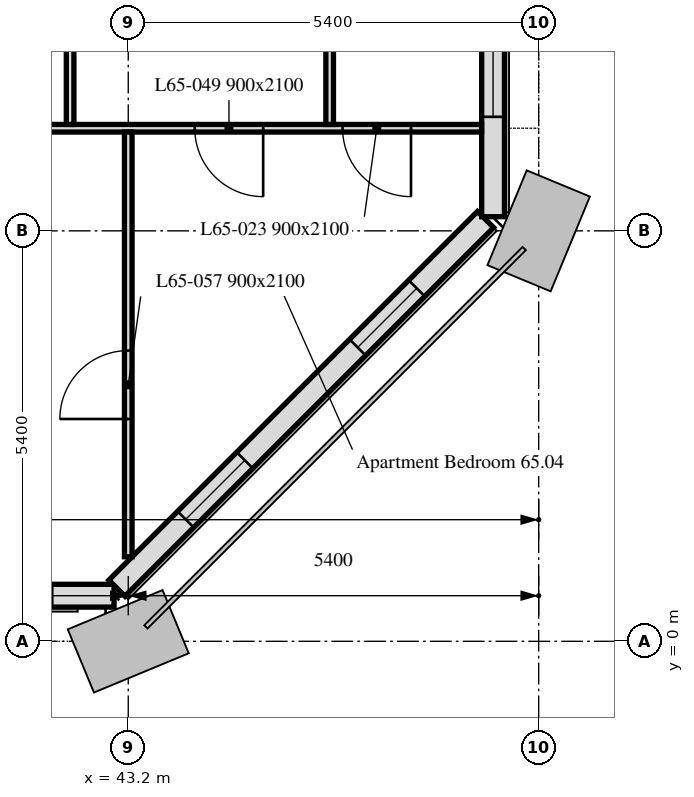
"""IFC4 building model, lengths in metres.
Left out: names, types, materials, properties, quantities, classifications, styles, units other than length and angle.
Written with IfcOpenShell. Run it as: python <this file> out.ifc"""

import sys

from ifc_helpers import new_model, si_unit, direction, frame, frame_2d, origin, place, context, subcontext, project, spatial, rectangle, extrude, element, fill, save


model = new_model("IFC4")
c1 = context("Model", 3, precision=1e-05, world=origin(), true_north=direction((0.0, 1.0)))
c2 = subcontext(c1, "Body", "Model", "MODEL_VIEW")
j1 = project(units=[si_unit("LENGTHUNIT", "METRE"), si_unit("PLANEANGLEUNIT", "RADIAN")], contexts=[c1])
p1 = place(None, origin())
s1 = spatial("IfcSite", under=j1, at=p1, CompositionType="ELEMENT")
p2 = place(p1, origin())
s2 = spatial("IfcBuilding", under=s1, at=p2, CompositionType="ELEMENT")
p3 = place(p2, frame((0.0, 0.0, 268.6)))
s3 = spatial("IfcBuildingStorey", under=s2, at=p3, CompositionType="ELEMENT", Elevation=268.6)
p4 = place(p3, frame((10.986, 0.6, 0.0), z_axis=(0.0, 0.0, 1.0), x_axis=(1.0, 0.0, 0.0)))
e1 = element("IfcWall", 1, at=p4, inside=s3, PredefinedType="SOLIDWALL", context=c2, shape_type="SweptSolid", body=[
    extrude(rectangle(XDim=32.027, YDim=0.3, at=frame_2d((16.014, 0.0))), origin(), (0.0, 0.0, 1.0), 3.0),
])
p5 = place(p4, frame((2.764, 0.0, 0.9)))
e2 = element("IfcOpeningElement", 2, at=p5, cuts=e1, PredefinedType="OPENING", context=c2, shape_type="SweptSolid", body=[
    extrude(rectangle(XDim=1.1, YDim=1.7, at=frame_2d((0.55, 0.85))), frame((0.0, 0.16, 0.0), z_axis=(0.0, -1.0, 0.0), x_axis=(1.0, 0.0, 0.0)), (0.0, 0.0, 1.0), 0.32),
])
p6 = place(p4, frame((6.214, 0.0, 0.9)))
e3 = element("IfcOpeningElement", 3, at=p6, cuts=e1, PredefinedType="OPENING", context=c2, shape_type="SweptSolid", body=[
    extrude(rectangle(XDim=3.4, YDim=1.7, at=frame_2d((1.7, 0.85))), frame((0.0, 0.16, 0.0), z_axis=(0.0, -1.0, 0.0), x_axis=(1.0, 0.0, 0.0)), (0.0, 0.0, 1.0), 0.32),
])
p7 = place(p4, frame((13.564, 0.0, 0.9)))
e4 = element("IfcOpeningElement", 4, at=p7, cuts=e1, PredefinedType="OPENING", context=c2, shape_type="SweptSolid", body=[
    extrude(rectangle(XDim=1.1, YDim=1.7, at=frame_2d((0.55, 0.85))), frame((0.0, 0.16, 0.0), z_axis=(0.0, -1.0, 0.0), x_axis=(1.0, 0.0, 0.0)), (0.0, 0.0, 1.0), 0.32),
])
p8 = place(p4, frame((17.014, 0.0, 0.9)))
e5 = element("IfcOpeningElement", 5, at=p8, cuts=e1, PredefinedType="OPENING", context=c2, shape_type="SweptSolid", body=[
    extrude(rectangle(XDim=3.4, YDim=1.7, at=frame_2d((1.7, 0.85))), frame((0.0, 0.16, 0.0), z_axis=(0.0, -1.0, 0.0), x_axis=(1.0, 0.0, 0.0)), (0.0, 0.0, 1.0), 0.32),
])
p9 = place(p4, frame((24.364, 0.0, 0.9)))
e6 = element("IfcOpeningElement", 6, at=p9, cuts=e1, PredefinedType="OPENING", context=c2, shape_type="SweptSolid", body=[
    extrude(rectangle(XDim=1.1, YDim=1.7, at=frame_2d((0.55, 0.85))), frame((0.0, 0.16, 0.0), z_axis=(0.0, -1.0, 0.0), x_axis=(1.0, 0.0, 0.0)), (0.0, 0.0, 1.0), 0.32),
])
p10 = place(p4, frame((27.814, 0.0, 0.9)))
e7 = element("IfcOpeningElement", 7, at=p10, cuts=e1, PredefinedType="OPENING", context=c2, shape_type="SweptSolid", body=[
    extrude(rectangle(XDim=3.4, YDim=1.7, at=frame_2d((1.7, 0.85))), frame((0.0, 0.16, 0.0), z_axis=(0.0, -1.0, 0.0), x_axis=(1.0, 0.0, 0.0)), (0.0, 0.0, 1.0), 0.32),
])
p11 = place(p3, frame((43.051, 0.699, 0.0), z_axis=(0.0, 0.0, 1.0), x_axis=(0.707106781187, 0.707106781187, 0.0)))
e8 = element("IfcWall", 8, at=p11, inside=s3, PredefinedType="SOLIDWALL", context=c2, shape_type="SweptSolid", body=[
    extrude(rectangle(XDim=6.86, YDim=0.3, at=frame_2d((3.43, 0.0))), origin(), (0.0, 0.0, 1.0), 3.0),
])
p12 = place(p11, frame((1.28, 0.0, 0.9)))
e9 = element("IfcOpeningElement", 9, at=p12, cuts=e8, PredefinedType="OPENING", context=c2, shape_type="SweptSolid", body=[
    extrude(rectangle(XDim=1.1, YDim=1.7, at=frame_2d((0.55, 0.85))), frame((0.0, 0.16, 0.0), z_axis=(0.0, -1.0, 0.0), x_axis=(1.0, 0.0, 0.0)), (0.0, 0.0, 1.0), 0.32),
])
p13 = place(p11, frame((4.48, 0.0, 0.9)))
e10 = element("IfcOpeningElement", 10, at=p13, cuts=e8, PredefinedType="OPENING", context=c2, shape_type="SweptSolid", body=[
    extrude(rectangle(XDim=1.1, YDim=1.7, at=frame_2d((0.55, 0.85))), frame((0.0, 0.16, 0.0), z_axis=(0.0, -1.0, 0.0), x_axis=(1.0, 0.0, 0.0)), (0.0, 0.0, 1.0), 0.32),
])
p14 = place(p3, frame((48.0, 5.586, 0.0), z_axis=(0.0, 0.0, 1.0), x_axis=(0.0, 1.0, 0.0)))
e11 = element("IfcWall", 11, at=p14, inside=s3, PredefinedType="SOLIDWALL", context=c2, shape_type="SweptSolid", body=[
    extrude(rectangle(XDim=32.027, YDim=0.3, at=frame_2d((16.014, 0.0))), origin(), (0.0, 0.0, 1.0), 3.0),
])
p15 = place(p14, frame((1.314, 0.0, 0.9)))
e12 = element("IfcOpeningElement", 12, at=p15, cuts=e11, PredefinedType="OPENING", context=c2, shape_type="SweptSolid", body=[
    extrude(rectangle(XDim=1.1, YDim=1.7, at=frame_2d((0.55, 0.85))), frame((0.0, 0.16, 0.0), z_axis=(0.0, -1.0, 0.0), x_axis=(1.0, 0.0, 0.0)), (0.0, 0.0, 1.0), 0.32),
])
p16 = place(p14, frame((2.764, 0.0, 0.9)))
e13 = element("IfcOpeningElement", 13, at=p16, cuts=e11, PredefinedType="OPENING", context=c2, shape_type="SweptSolid", body=[
    extrude(rectangle(XDim=1.1, YDim=1.7, at=frame_2d((0.55, 0.85))), frame((0.0, 0.16, 0.0), z_axis=(0.0, -1.0, 0.0), x_axis=(1.0, 0.0, 0.0)), (0.0, 0.0, 1.0), 0.32),
])
p17 = place(p14, frame((6.564, 0.0, 0.9)))
e14 = element("IfcOpeningElement", 14, at=p17, cuts=e11, PredefinedType="OPENING", context=c2, shape_type="SweptSolid", body=[
    extrude(rectangle(XDim=1.1, YDim=1.7, at=frame_2d((0.55, 0.85))), frame((0.0, 0.16, 0.0), z_axis=(0.0, -1.0, 0.0), x_axis=(1.0, 0.0, 0.0)), (0.0, 0.0, 1.0), 0.32),
])
p18 = place(p14, frame((8.514, 0.0, 0.9)))
e15 = element("IfcOpeningElement", 15, at=p18, cuts=e11, PredefinedType="OPENING", context=c2, shape_type="SweptSolid", body=[
    extrude(rectangle(XDim=1.1, YDim=1.7, at=frame_2d((0.55, 0.85))), frame((0.0, 0.16, 0.0), z_axis=(0.0, -1.0, 0.0), x_axis=(1.0, 0.0, 0.0)), (0.0, 0.0, 1.0), 0.32),
])
p19 = place(p14, frame((11.964, 0.0, 0.9)))
e16 = element("IfcOpeningElement", 16, at=p19, cuts=e11, PredefinedType="OPENING", context=c2, shape_type="SweptSolid", body=[
    extrude(rectangle(XDim=1.1, YDim=1.7, at=frame_2d((0.55, 0.85))), frame((0.0, 0.16, 0.0), z_axis=(0.0, -1.0, 0.0), x_axis=(1.0, 0.0, 0.0)), (0.0, 0.0, 1.0), 0.32),
])
p20 = place(p14, frame((13.564, 0.0, 0.9)))
e17 = element("IfcOpeningElement", 17, at=p20, cuts=e11, PredefinedType="OPENING", context=c2, shape_type="SweptSolid", body=[
    extrude(rectangle(XDim=1.1, YDim=1.7, at=frame_2d((0.55, 0.85))), frame((0.0, 0.16, 0.0), z_axis=(0.0, -1.0, 0.0), x_axis=(1.0, 0.0, 0.0)), (0.0, 0.0, 1.0), 0.32),
])
p21 = place(p14, frame((17.014, 0.0, 0.9)))
e18 = element("IfcOpeningElement", 18, at=p21, cuts=e11, PredefinedType="OPENING", context=c2, shape_type="SweptSolid", body=[
    extrude(rectangle(XDim=3.4, YDim=1.7, at=frame_2d((1.7, 0.85))), frame((0.0, 0.16, 0.0), z_axis=(0.0, -1.0, 0.0), x_axis=(1.0, 0.0, 0.0)), (0.0, 0.0, 1.0), 0.32),
])
p22 = place(p14, frame((22.764, 0.0, 0.9)))
e19 = element("IfcOpeningElement", 19, at=p22, cuts=e11, PredefinedType="OPENING", context=c2, shape_type="SweptSolid", body=[
    extrude(rectangle(XDim=1.1, YDim=1.7, at=frame_2d((0.55, 0.85))), frame((0.0, 0.16, 0.0), z_axis=(0.0, -1.0, 0.0), x_axis=(1.0, 0.0, 0.0)), (0.0, 0.0, 1.0), 0.32),
])
p23 = place(p14, frame((24.364, 0.0, 0.9)))
e20 = element("IfcOpeningElement", 20, at=p23, cuts=e11, PredefinedType="OPENING", context=c2, shape_type="SweptSolid", body=[
    extrude(rectangle(XDim=1.1, YDim=1.7, at=frame_2d((0.55, 0.85))), frame((0.0, 0.16, 0.0), z_axis=(0.0, -1.0, 0.0), x_axis=(1.0, 0.0, 0.0)), (0.0, 0.0, 1.0), 0.32),
])
p24 = place(p14, frame((28.239, 0.0, 0.9)))
e21 = element("IfcOpeningElement", 21, at=p24, cuts=e11, PredefinedType="OPENING", context=c2, shape_type="SweptSolid", body=[
    extrude(rectangle(XDim=0.65, YDim=1.7, at=frame_2d((0.325, 0.85))), frame((0.0, 0.16, 0.0), z_axis=(0.0, -1.0, 0.0), x_axis=(1.0, 0.0, 0.0)), (0.0, 0.0, 1.0), 0.32),
])
p25 = place(p14, frame((29.764, 0.0, 0.9)))
e22 = element("IfcOpeningElement", 22, at=p25, cuts=e11, PredefinedType="OPENING", context=c2, shape_type="SweptSolid", body=[
    extrude(rectangle(XDim=1.1, YDim=1.7, at=frame_2d((0.55, 0.85))), frame((0.0, 0.16, 0.0), z_axis=(0.0, -1.0, 0.0), x_axis=(1.0, 0.0, 0.0)), (0.0, 0.0, 1.0), 0.32),
])
p26 = place(p3, frame((47.849, 6.75, 0.0), z_axis=(0.0, 0.0, 1.0), x_axis=(-1.0, 0.0, 0.0)))
e23 = element("IfcWall", 23, at=p26, inside=s3, PredefinedType="PARTITIONING", context=c2, shape_type="SweptSolid", body=[
    extrude(rectangle(XDim=15.374, YDim=0.1, at=frame_2d((7.687, 0.0))), origin(), (0.0, 0.0, 1.0), 2.4),
])
p27 = place(p26, frame((0.929, 0.0, 0.0)))
e24 = element("IfcOpeningElement", 24, at=p27, cuts=e23, PredefinedType="OPENING", context=c2, shape_type="SweptSolid", body=[
    extrude(rectangle(XDim=0.9, YDim=2.1, at=frame_2d((0.45, 1.05))), frame((0.0, 0.05, 0.0), z_axis=(0.0, -1.0, 0.0), x_axis=(1.0, 0.0, 0.0)), (0.0, 0.0, 1.0), 0.1),
])
p28 = place(p26, frame((13.149, 0.0, 0.0)))
e25 = element("IfcOpeningElement", 25, at=p28, cuts=e23, PredefinedType="OPENING", context=c2, shape_type="SweptSolid", body=[
    extrude(rectangle(XDim=0.9, YDim=2.1, at=frame_2d((0.45, 1.05))), frame((0.0, 0.05, 0.0), z_axis=(0.0, -1.0, 0.0), x_axis=(1.0, 0.0, 0.0)), (0.0, 0.0, 1.0), 0.1),
])
p29 = place(p26, frame((2.874, 0.0, 0.0)))
e26 = element("IfcOpeningElement", 26, at=p29, cuts=e23, PredefinedType="OPENING", context=c2, shape_type="SweptSolid", body=[
    extrude(rectangle(XDim=0.9, YDim=2.1, at=frame_2d((0.45, 1.05))), frame((0.0, 0.05, 0.0), z_axis=(0.0, -1.0, 0.0), x_axis=(1.0, 0.0, 0.0)), (0.0, 0.0, 1.0), 0.1),
])
p30 = place(p26, frame((8.463, 0.0, 0.0)))
e27 = element("IfcOpeningElement", 27, at=p30, cuts=e23, PredefinedType="OPENING", context=c2, shape_type="SweptSolid", body=[
    extrude(rectangle(XDim=0.9, YDim=2.1, at=frame_2d((0.45, 1.05))), frame((0.0, 0.05, 0.0), z_axis=(0.0, -1.0, 0.0), x_axis=(1.0, 0.0, 0.0)), (0.0, 0.0, 1.0), 0.1),
])
p31 = place(p3, frame((43.2, 1.112, 0.0), z_axis=(0.0, 0.0, 1.0), x_axis=(0.0, 1.0, 0.0)))
e28 = element("IfcWall", 28, at=p31, inside=s3, PredefinedType="PARTITIONING", context=c2, shape_type="SweptSolid", body=[
    extrude(rectangle(XDim=5.588, YDim=0.1, at=frame_2d((2.794, 0.0))), origin(), (0.0, 0.0, 1.0), 3.0),
])
p32 = place(p31, frame((1.813, 0.0, 0.0)))
e29 = element("IfcOpeningElement", 29, at=p32, cuts=e28, PredefinedType="OPENING", context=c2, shape_type="SweptSolid", body=[
    extrude(rectangle(XDim=0.9, YDim=2.1, at=frame_2d((0.45, 1.05))), frame((0.0, 0.05, 0.0), z_axis=(0.0, -1.0, 0.0), x_axis=(1.0, 0.0, 0.0)), (0.0, 0.0, 1.0), 0.1),
])
for number, where, z_axis, x_axis in (
    (30, (42.435, 6.8, 0.0), (0.0, 0.0, 1.0), (0.0, 1.0, 0.0)),
    (31, (45.85, 6.8, 0.0), (0.0, 0.0, 1.0), (0.0, 1.0, 0.0)),
):
    element("IfcWall", number, at=place(p3, frame(where, z_axis=z_axis, x_axis=x_axis)), inside=s3, PredefinedType="PARTITIONING", context=c2, shape_type="SweptSolid", body=[
        extrude(rectangle(XDim=7.075, YDim=0.1, at=frame_2d((3.538, 0.0))), origin(), (0.0, 0.0, 1.0), 2.4),
    ])
p33 = place(p12, origin())
e32 = element("IfcWindow", 32, at=p33, inside=s3, PartitioningType="SINGLE_PANEL", PredefinedType="WINDOW", context=c2, shape_type="SweptSolid", body=[
    extrude(rectangle(XDim=1.1, YDim=1.7, at=frame_2d((0.55, 0.85))), frame((0.0, 0.03, 0.0), z_axis=(0.0, -1.0, 0.0), x_axis=(1.0, 0.0, 0.0)), (0.0, 0.0, 1.0), 0.06),
])
fill(e9, e32)
p34 = place(p13, origin())
e33 = element("IfcWindow", 33, at=p34, inside=s3, PartitioningType="SINGLE_PANEL", PredefinedType="WINDOW", context=c2, shape_type="SweptSolid", body=[
    extrude(rectangle(XDim=1.1, YDim=1.7, at=frame_2d((0.55, 0.85))), frame((0.0, 0.03, 0.0), z_axis=(0.0, -1.0, 0.0), x_axis=(1.0, 0.0, 0.0)), (0.0, 0.0, 1.0), 0.06),
])
fill(e10, e33)
p35 = place(p15, origin())
e34 = element("IfcWindow", 34, at=p35, inside=s3, PartitioningType="SINGLE_PANEL", PredefinedType="WINDOW", context=c2, shape_type="SweptSolid", body=[
    extrude(rectangle(XDim=1.1, YDim=1.7, at=frame_2d((0.55, 0.85))), frame((0.0, 0.03, 0.0), z_axis=(0.0, -1.0, 0.0), x_axis=(1.0, 0.0, 0.0)), (0.0, 0.0, 1.0), 0.06),
])
fill(e12, e34)
p36 = place(p27, origin())
e35 = element("IfcDoor", 35, at=p36, inside=s3, OperationType="SINGLE_SWING_RIGHT", PredefinedType="DOOR", context=c2, shape_type="SweptSolid", body=[
    extrude(rectangle(XDim=0.9, YDim=2.1, at=frame_2d((0.45, 1.05))), frame((0.0, 0.025, 0.0), z_axis=(0.0, -1.0, 0.0), x_axis=(1.0, 0.0, 0.0)), (0.0, 0.0, 1.0), 0.05),
])
fill(e24, e35)
p37 = place(p29, origin())
e36 = element("IfcDoor", 36, at=p37, inside=s3, OperationType="SINGLE_SWING_LEFT", PredefinedType="DOOR", context=c2, shape_type="SweptSolid", body=[
    extrude(rectangle(XDim=0.9, YDim=2.1, at=frame_2d((0.45, 1.05))), frame((0.0, 0.025, 0.0), z_axis=(0.0, -1.0, 0.0), x_axis=(1.0, 0.0, 0.0)), (0.0, 0.0, 1.0), 0.05),
])
fill(e26, e36)
p38 = place(p32, origin())
e37 = element("IfcDoor", 37, at=p38, inside=s3, OperationType="SINGLE_SWING_RIGHT", PredefinedType="DOOR", context=c2, shape_type="SweptSolid", body=[
    extrude(rectangle(XDim=0.9, YDim=2.1, at=frame_2d((0.45, 1.05))), frame((0.0, 0.025, 0.0), z_axis=(0.0, -1.0, 0.0), x_axis=(1.0, 0.0, 0.0)), (0.0, 0.0, 1.0), 0.05),
])
fill(e29, e37)
save(model, sys.argv[1])
